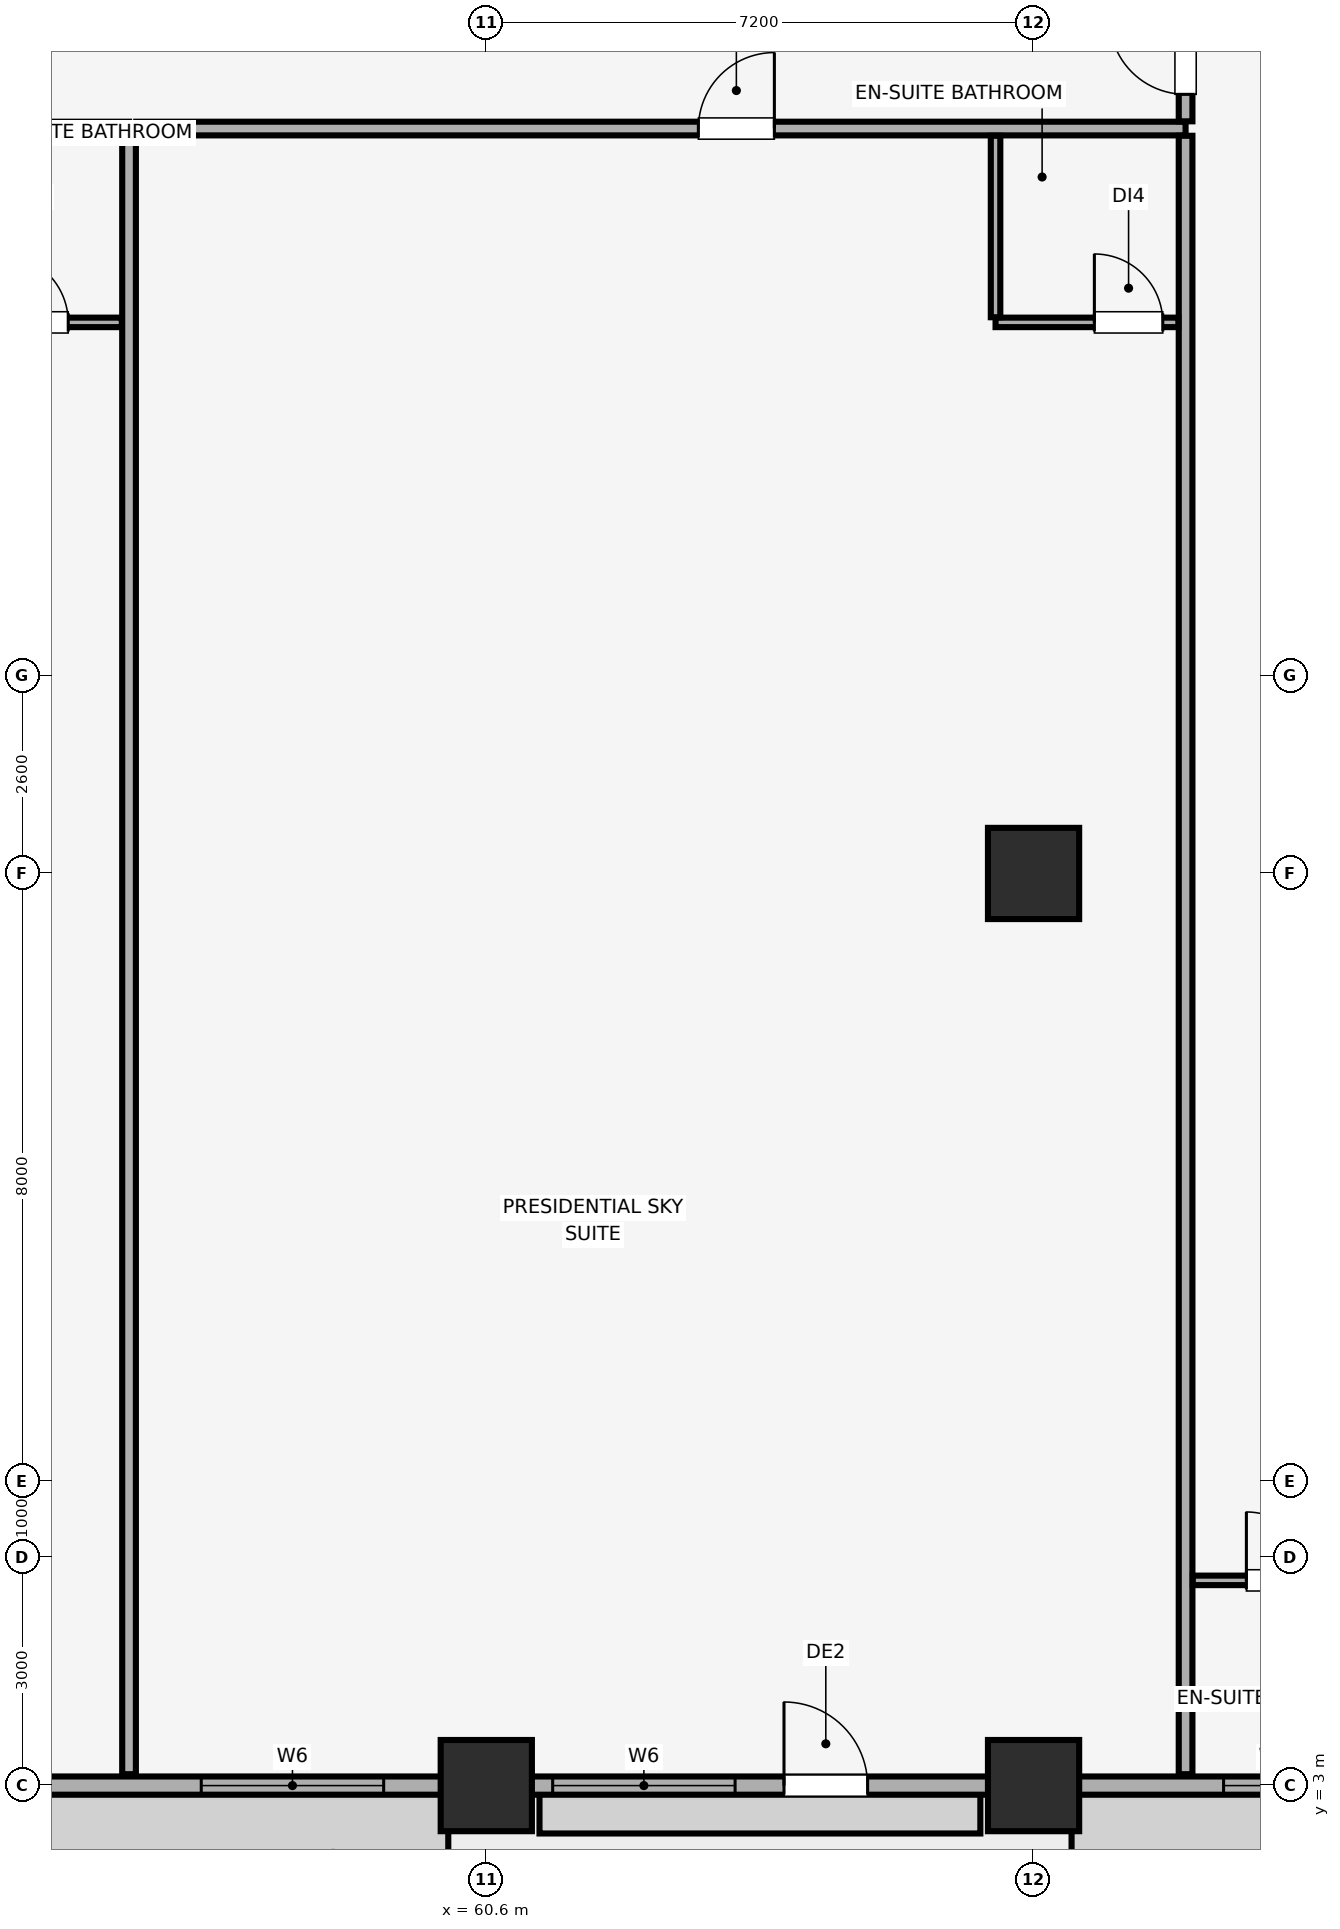
"""IFC4 building model, lengths in metres.
Left out: names, types, materials, properties, quantities, classifications, styles, units other than length and angle.
Written with IfcOpenShell. Run it as: python <this file> out.ifc"""

import sys

from ifc_helpers import new_model, si_unit, direction, frame, frame_2d, origin, origin_2d, place, context, subcontext, project, spatial, rectangle, extrude, element, fill, save


model = new_model("IFC4")
c1 = context("Model", 3, precision=1e-05, world=origin(), true_north=direction((0.0, 1.0)))
c2 = subcontext(c1, "Body", "Model", "MODEL_VIEW")
j1 = project(units=[si_unit("LENGTHUNIT", "METRE"), si_unit("PLANEANGLEUNIT", "RADIAN")], contexts=[c1])
p1 = place(None, origin())
s1 = spatial("IfcSite", under=j1, at=p1, CompositionType="ELEMENT")
p2 = place(p1, origin())
s2 = spatial("IfcBuilding", under=s1, at=p2, CompositionType="ELEMENT")
p3 = place(p2, frame((0.0, 0.0, 220.55)))
s3 = spatial("IfcBuildingStorey", under=s2, at=p3, CompositionType="ELEMENT", Elevation=220.55)
for number, where, z_axis, x_axis in (
    (1, (60.6, 3.0, 0.0), (0.0, 0.0, 1.0), (1.0, 0.0, 0.0)),
    (2, (67.8, 3.0, 0.0), (0.0, 0.0, 1.0), (1.0, 0.0, 0.0)),
    (3, (67.8, 15.0, 0.0), (0.0, 0.0, 1.0), (1.0, 0.0, 0.0)),
):
    element("IfcColumn", number, at=place(p3, frame(where, z_axis=z_axis, x_axis=x_axis)), inside=s3, PredefinedType="COLUMN", context=c2, shape_type="SweptSolid", body=[
        extrude(rectangle(XDim=1.2, YDim=1.2, at=origin_2d()), origin(), (0.0, 0.0, 1.0), 3.56),
    ])
p4 = place(p3, frame((7.0, 3.0, 0.0), z_axis=(0.0, 0.0, 1.0), x_axis=(1.0, 0.0, 0.0)))
e4 = element("IfcWall", 4, at=p4, inside=s3, PredefinedType="SOLIDWALL", context=c2, shape_type="SweptSolid", body=[
    extrude(rectangle(XDim=70.0, YDim=0.24, at=frame_2d((35.0, 0.0))), origin(), (0.0, 0.0, 1.0), 2.76),
])
p5 = place(p4, frame((17.86, 0.0, 0.0)))
e5 = element("IfcOpeningElement", 5, at=p5, cuts=e4, PredefinedType="OPENING", context=c2, shape_type="SweptSolid", body=[
    extrude(rectangle(XDim=1.1, YDim=2.15, at=frame_2d((0.55, 1.075))), frame((0.0, 0.13, 0.0), z_axis=(0.0, -1.0, 0.0), x_axis=(1.0, 0.0, 0.0)), (0.0, 0.0, 1.0), 0.26),
])
p6 = place(p4, frame((26.317, 0.0, 0.0)))
e6 = element("IfcOpeningElement", 6, at=p6, cuts=e4, PredefinedType="OPENING", context=c2, shape_type="SweptSolid", body=[
    extrude(rectangle(XDim=1.1, YDim=2.15, at=frame_2d((0.55, 1.075))), frame((0.0, 0.13, 0.0), z_axis=(0.0, -1.0, 0.0), x_axis=(1.0, 0.0, 0.0)), (0.0, 0.0, 1.0), 0.26),
])
p7 = place(p4, frame((57.517, 0.0, 0.0)))
e7 = element("IfcOpeningElement", 7, at=p7, cuts=e4, PredefinedType="OPENING", context=c2, shape_type="SweptSolid", body=[
    extrude(rectangle(XDim=1.1, YDim=2.15, at=frame_2d((0.55, 1.075))), frame((0.0, 0.13, 0.0), z_axis=(0.0, -1.0, 0.0), x_axis=(1.0, 0.0, 0.0)), (0.0, 0.0, 1.0), 0.26),
])
p8 = place(p4, frame((5.2, 0.0, 0.85)))
e8 = element("IfcOpeningElement", 8, at=p8, cuts=e4, PredefinedType="OPENING", context=c2, shape_type="SweptSolid", body=[
    extrude(rectangle(XDim=1.5, YDim=1.4, at=frame_2d((0.75, 0.7))), frame((0.0, 0.13, 0.0), z_axis=(0.0, -1.0, 0.0), x_axis=(1.0, 0.0, 0.0)), (0.0, 0.0, 1.0), 0.26),
])
p9 = place(p4, frame((10.7, 0.0, 0.85)))
e9 = element("IfcOpeningElement", 9, at=p9, cuts=e4, PredefinedType="OPENING", context=c2, shape_type="SweptSolid", body=[
    extrude(rectangle(XDim=4.2, YDim=1.65, at=frame_2d((2.1, 0.825))), frame((0.0, 0.13, 0.0), z_axis=(0.0, -1.0, 0.0), x_axis=(1.0, 0.0, 0.0)), (0.0, 0.0, 1.0), 0.26),
])
p10 = place(p4, frame((28.243, 0.0, 0.85)))
e10 = element("IfcOpeningElement", 10, at=p10, cuts=e4, PredefinedType="OPENING", context=c2, shape_type="SweptSolid", body=[
    extrude(rectangle(XDim=1.5, YDim=1.4, at=frame_2d((0.75, 0.7))), frame((0.0, 0.13, 0.0), z_axis=(0.0, -1.0, 0.0), x_axis=(1.0, 0.0, 0.0)), (0.0, 0.0, 1.0), 0.26),
])
p11 = place(p4, frame((31.9, 0.0, 0.85)))
e11 = element("IfcOpeningElement", 11, at=p11, cuts=e4, PredefinedType="OPENING", context=c2, shape_type="SweptSolid", body=[
    extrude(rectangle(XDim=2.4, YDim=1.5, at=frame_2d((1.2, 0.75))), frame((0.0, 0.13, 0.0), z_axis=(0.0, -1.0, 0.0), x_axis=(1.0, 0.0, 0.0)), (0.0, 0.0, 1.0), 0.26),
])
p12 = place(p4, frame((35.7, 0.0, 0.85)))
e12 = element("IfcOpeningElement", 12, at=p12, cuts=e4, PredefinedType="OPENING", context=c2, shape_type="SweptSolid", body=[
    extrude(rectangle(XDim=2.4, YDim=1.5, at=frame_2d((1.2, 0.75))), frame((0.0, 0.13, 0.0), z_axis=(0.0, -1.0, 0.0), x_axis=(1.0, 0.0, 0.0)), (0.0, 0.0, 1.0), 0.26),
])
p13 = place(p4, frame((40.7, 0.0, 0.85)))
e13 = element("IfcOpeningElement", 13, at=p13, cuts=e4, PredefinedType="OPENING", context=c2, shape_type="SweptSolid", body=[
    extrude(rectangle(XDim=4.2, YDim=1.65, at=frame_2d((2.1, 0.825))), frame((0.0, 0.13, 0.0), z_axis=(0.0, -1.0, 0.0), x_axis=(1.0, 0.0, 0.0)), (0.0, 0.0, 1.0), 0.26),
])
p14 = place(p4, frame((49.85, 0.0, 0.85)))
e14 = element("IfcOpeningElement", 14, at=p14, cuts=e4, PredefinedType="OPENING", context=c2, shape_type="SweptSolid", body=[
    extrude(rectangle(XDim=2.4, YDim=1.5, at=frame_2d((1.2, 0.75))), frame((0.0, 0.13, 0.0), z_axis=(0.0, -1.0, 0.0), x_axis=(1.0, 0.0, 0.0)), (0.0, 0.0, 1.0), 0.26),
])
p15 = place(p4, frame((54.473, 0.0, 0.85)))
e15 = element("IfcOpeningElement", 15, at=p15, cuts=e4, PredefinedType="OPENING", context=c2, shape_type="SweptSolid", body=[
    extrude(rectangle(XDim=2.4, YDim=1.5, at=frame_2d((1.2, 0.75))), frame((0.0, 0.13, 0.0), z_axis=(0.0, -1.0, 0.0), x_axis=(1.0, 0.0, 0.0)), (0.0, 0.0, 1.0), 0.26),
])
p16 = place(p4, frame((63.3, 0.0, 0.85)))
e16 = element("IfcOpeningElement", 16, at=p16, cuts=e4, PredefinedType="OPENING", context=c2, shape_type="SweptSolid", body=[
    extrude(rectangle(XDim=1.5, YDim=1.4, at=frame_2d((0.75, 0.7))), frame((0.0, 0.13, 0.0), z_axis=(0.0, -1.0, 0.0), x_axis=(1.0, 0.0, 0.0)), (0.0, 0.0, 1.0), 0.26),
])
p17 = place(p3, frame((42.095, 24.8, 0.0), z_axis=(0.0, 0.0, 1.0), x_axis=(1.0, 0.0, 0.0)))
e17 = element("IfcWall", 17, at=p17, inside=s3, PredefinedType="PARTITIONING", context=c2, shape_type="SweptSolid", body=[
    extrude(rectangle(XDim=13.805, YDim=0.18, at=frame_2d((6.902, 0.0))), origin(), (0.0, 0.0, 1.0), 3.56),
])
p18 = place(p17, frame((7.145, 0.0, 0.0)))
e18 = element("IfcOpeningElement", 18, at=p18, cuts=e17, PredefinedType="OPENING", context=c2, shape_type="SweptSolid", body=[
    extrude(rectangle(XDim=1.0, YDim=2.15, at=frame_2d((0.5, 1.075))), frame((0.0, 0.1, 0.0), z_axis=(0.0, -1.0, 0.0), x_axis=(1.0, 0.0, 0.0)), (0.0, 0.0, 1.0), 0.2),
])
p19 = place(p3, frame((55.9, 3.15, 0.0), z_axis=(0.0, 0.0, 1.0), x_axis=(0.0, 1.0, 0.0)))
e19 = element("IfcWall", 19, at=p19, inside=s3, PredefinedType="PARTITIONING", context=c2, shape_type="SweptSolid", body=[
    extrude(rectangle(XDim=21.555, YDim=0.18, at=frame_2d((10.778, 0.0))), origin(), (0.0, 0.0, 1.0), 3.56),
])
p20 = place(p3, frame((53.4, 22.25, 0.0), z_axis=(0.0, 0.0, 1.0), x_axis=(1.0, 0.0, 0.0)))
e20 = element("IfcWall", 20, at=p20, inside=s3, PredefinedType="PARTITIONING", context=c2, shape_type="SweptSolid", body=[
    extrude(rectangle(XDim=2.405, YDim=0.125, at=frame_2d((1.203, 0.0))), origin(), (0.0, 0.0, 1.0), 3.56),
])
p21 = place(p20, frame((0.8, 0.0, 0.0)))
e21 = element("IfcOpeningElement", 21, at=p21, cuts=e20, PredefinedType="OPENING", context=c2, shape_type="SweptSolid", body=[
    extrude(rectangle(XDim=0.9, YDim=2.1, at=frame_2d((0.45, 1.05))), frame((0.0, 0.073, 0.0), z_axis=(0.0, -1.0, 0.0), x_axis=(1.0, 0.0, 0.0)), (0.0, 0.0, 1.0), 0.145),
])
p22 = place(p3, frame((55.995, 24.8, 0.0), z_axis=(0.0, 0.0, 1.0), x_axis=(1.0, 0.0, 0.0)))
e22 = element("IfcWall", 22, at=p22, inside=s3, PredefinedType="PARTITIONING", context=c2, shape_type="SweptSolid", body=[
    extrude(rectangle(XDim=13.805, YDim=0.18, at=frame_2d((6.902, 0.0))), origin(), (0.0, 0.0, 1.0), 3.56),
])
p23 = place(p22, frame((7.395, 0.0, 0.0)))
e23 = element("IfcOpeningElement", 23, at=p23, cuts=e22, PredefinedType="OPENING", context=c2, shape_type="SweptSolid", body=[
    extrude(rectangle(XDim=1.0, YDim=2.15, at=frame_2d((0.5, 1.075))), frame((0.0, 0.1, 0.0), z_axis=(0.0, -1.0, 0.0), x_axis=(1.0, 0.0, 0.0)), (0.0, 0.0, 1.0), 0.2),
])
p24 = place(p3, frame((69.8, 3.15, 0.0), z_axis=(0.0, 0.0, 1.0), x_axis=(0.0, 1.0, 0.0)))
e24 = element("IfcWall", 24, at=p24, inside=s3, PredefinedType="PARTITIONING", context=c2, shape_type="SweptSolid", body=[
    extrude(rectangle(XDim=21.555, YDim=0.18, at=frame_2d((10.778, 0.0))), origin(), (0.0, 0.0, 1.0), 3.56),
])
p25 = place(p3, frame((67.3, 22.25, 0.0), z_axis=(0.0, 0.0, 1.0), x_axis=(1.0, 0.0, 0.0)))
e25 = element("IfcWall", 25, at=p25, inside=s3, PredefinedType="PARTITIONING", context=c2, shape_type="SweptSolid", body=[
    extrude(rectangle(XDim=2.405, YDim=0.125, at=frame_2d((1.203, 0.0))), origin(), (0.0, 0.0, 1.0), 3.56),
])
p26 = place(p25, frame((1.3, 0.0, 0.0)))
e26 = element("IfcOpeningElement", 26, at=p26, cuts=e25, PredefinedType="OPENING", context=c2, shape_type="SweptSolid", body=[
    extrude(rectangle(XDim=0.9, YDim=2.1, at=frame_2d((0.45, 1.05))), frame((0.0, 0.073, 0.0), z_axis=(0.0, -1.0, 0.0), x_axis=(1.0, 0.0, 0.0)), (0.0, 0.0, 1.0), 0.145),
])
p27 = place(p3, frame((67.3, 22.317, 0.0), z_axis=(0.0, 0.0, 1.0), x_axis=(0.0, 1.0, 0.0)))
e27 = element("IfcWall", 27, at=p27, inside=s3, PredefinedType="PARTITIONING", context=c2, shape_type="SweptSolid", body=[
    extrude(rectangle(XDim=2.388, YDim=0.125, at=frame_2d((1.194, 0.0))), origin(), (0.0, 0.0, 1.0), 3.56),
])
p28 = place(p3, frame((69.8, 24.895, 0.0), z_axis=(0.0, 0.0, 1.0), x_axis=(0.0, 1.0, 0.0)))
e28 = element("IfcWall", 28, at=p28, inside=s3, PredefinedType="PARTITIONING", context=c2, shape_type="SweptSolid", body=[
    extrude(rectangle(XDim=4.41, YDim=0.18, at=frame_2d((2.205, 0.0))), origin(), (0.0, 0.0, 1.0), 3.56),
])
p29 = place(p28, frame((0.355, 0.0, 0.0)))
e29 = element("IfcOpeningElement", 29, at=p29, cuts=e28, PredefinedType="OPENING", context=c2, shape_type="SweptSolid", body=[
    extrude(rectangle(XDim=1.0, YDim=2.15, at=frame_2d((0.5, 1.075))), frame((0.0, 0.1, 0.0), z_axis=(0.0, -1.0, 0.0), x_axis=(1.0, 0.0, 0.0)), (0.0, 0.0, 1.0), 0.2),
])
p30 = place(p3, frame((69.895, 5.7, 0.0), z_axis=(0.0, 0.0, 1.0), x_axis=(1.0, 0.0, 0.0)))
e30 = element("IfcWall", 30, at=p30, inside=s3, PredefinedType="PARTITIONING", context=c2, shape_type="SweptSolid", body=[
    extrude(rectangle(XDim=2.405, YDim=0.125, at=frame_2d((1.203, 0.0))), origin(), (0.0, 0.0, 1.0), 3.56),
])
p31 = place(p30, frame((0.705, 0.0, 0.0)))
e31 = element("IfcOpeningElement", 31, at=p31, cuts=e30, PredefinedType="OPENING", context=c2, shape_type="SweptSolid", body=[
    extrude(rectangle(XDim=0.9, YDim=2.1, at=frame_2d((0.45, 1.05))), frame((0.0, 0.073, 0.0), z_axis=(0.0, -1.0, 0.0), x_axis=(1.0, 0.0, 0.0)), (0.0, 0.0, 1.0), 0.145),
])
p32 = place(p7, origin())
e32 = element("IfcDoor", 32, at=p32, inside=s3, OperationType="SINGLE_SWING_LEFT", PredefinedType="DOOR", context=c2, shape_type="SweptSolid", body=[
    extrude(rectangle(XDim=1.1, YDim=2.15, at=frame_2d((0.55, 1.075))), frame((0.0, 0.025, 0.0), z_axis=(0.0, -1.0, 0.0), x_axis=(1.0, 0.0, 0.0)), (0.0, 0.0, 1.0), 0.05),
])
fill(e7, e32)
p33 = place(p14, origin())
e33 = element("IfcWindow", 33, at=p33, inside=s3, PartitioningType="SINGLE_PANEL", PredefinedType="WINDOW", context=c2, shape_type="SweptSolid", body=[
    extrude(rectangle(XDim=2.4, YDim=1.5, at=frame_2d((1.2, 0.75))), frame((0.0, 0.03, 0.0), z_axis=(0.0, -1.0, 0.0), x_axis=(1.0, 0.0, 0.0)), (0.0, 0.0, 1.0), 0.06),
])
fill(e14, e33)
p34 = place(p15, origin())
e34 = element("IfcWindow", 34, at=p34, inside=s3, PartitioningType="SINGLE_PANEL", PredefinedType="WINDOW", context=c2, shape_type="SweptSolid", body=[
    extrude(rectangle(XDim=2.4, YDim=1.5, at=frame_2d((1.2, 0.75))), frame((0.0, 0.03, 0.0), z_axis=(0.0, -1.0, 0.0), x_axis=(1.0, 0.0, 0.0)), (0.0, 0.0, 1.0), 0.06),
])
fill(e15, e34)
p35 = place(p16, origin())
e35 = element("IfcWindow", 35, at=p35, inside=s3, PartitioningType="SINGLE_PANEL", PredefinedType="WINDOW", context=c2, shape_type="SweptSolid", body=[
    extrude(rectangle(XDim=1.5, YDim=1.4, at=frame_2d((0.75, 0.7))), frame((0.0, 0.03, 0.0), z_axis=(0.0, -1.0, 0.0), x_axis=(1.0, 0.0, 0.0)), (0.0, 0.0, 1.0), 0.06),
])
fill(e16, e35)
p36 = place(p21, origin())
e36 = element("IfcDoor", 36, at=p36, inside=s3, OperationType="SINGLE_SWING_LEFT", PredefinedType="DOOR", context=c2, shape_type="SweptSolid", body=[
    extrude(rectangle(XDim=0.9, YDim=2.1, at=frame_2d((0.45, 1.05))), frame((0.0, 0.025, 0.0), z_axis=(0.0, -1.0, 0.0), x_axis=(1.0, 0.0, 0.0)), (0.0, 0.0, 1.0), 0.05),
])
fill(e21, e36)
p37 = place(p23, origin())
e37 = element("IfcDoor", 37, at=p37, inside=s3, OperationType="SINGLE_SWING_RIGHT", PredefinedType="DOOR", context=c2, shape_type="SweptSolid", body=[
    extrude(rectangle(XDim=1.0, YDim=2.15, at=frame_2d((0.5, 1.075))), frame((0.0, 0.025, 0.0), z_axis=(0.0, -1.0, 0.0), x_axis=(1.0, 0.0, 0.0)), (0.0, 0.0, 1.0), 0.05),
])
fill(e23, e37)
p38 = place(p26, origin())
e38 = element("IfcDoor", 38, at=p38, inside=s3, OperationType="SINGLE_SWING_LEFT", PredefinedType="DOOR", context=c2, shape_type="SweptSolid", body=[
    extrude(rectangle(XDim=0.9, YDim=2.1, at=frame_2d((0.45, 1.05))), frame((0.0, 0.025, 0.0), z_axis=(0.0, -1.0, 0.0), x_axis=(1.0, 0.0, 0.0)), (0.0, 0.0, 1.0), 0.05),
])
fill(e26, e38)
p39 = place(p29, origin())
e39 = element("IfcDoor", 39, at=p39, inside=s3, OperationType="SINGLE_SWING_RIGHT", PredefinedType="DOOR", context=c2, shape_type="SweptSolid", body=[
    extrude(rectangle(XDim=1.0, YDim=2.15, at=frame_2d((0.5, 1.075))), frame((0.0, 0.025, 0.0), z_axis=(0.0, -1.0, 0.0), x_axis=(1.0, 0.0, 0.0)), (0.0, 0.0, 1.0), 0.05),
])
fill(e29, e39)
p40 = place(p31, origin())
e40 = element("IfcDoor", 40, at=p40, inside=s3, OperationType="SINGLE_SWING_LEFT", PredefinedType="DOOR", context=c2, shape_type="SweptSolid", body=[
    extrude(rectangle(XDim=0.9, YDim=2.1, at=frame_2d((0.45, 1.05))), frame((0.0, 0.025, 0.0), z_axis=(0.0, -1.0, 0.0), x_axis=(1.0, 0.0, 0.0)), (0.0, 0.0, 1.0), 0.05),
])
fill(e31, e40)
save(model, sys.argv[1])
